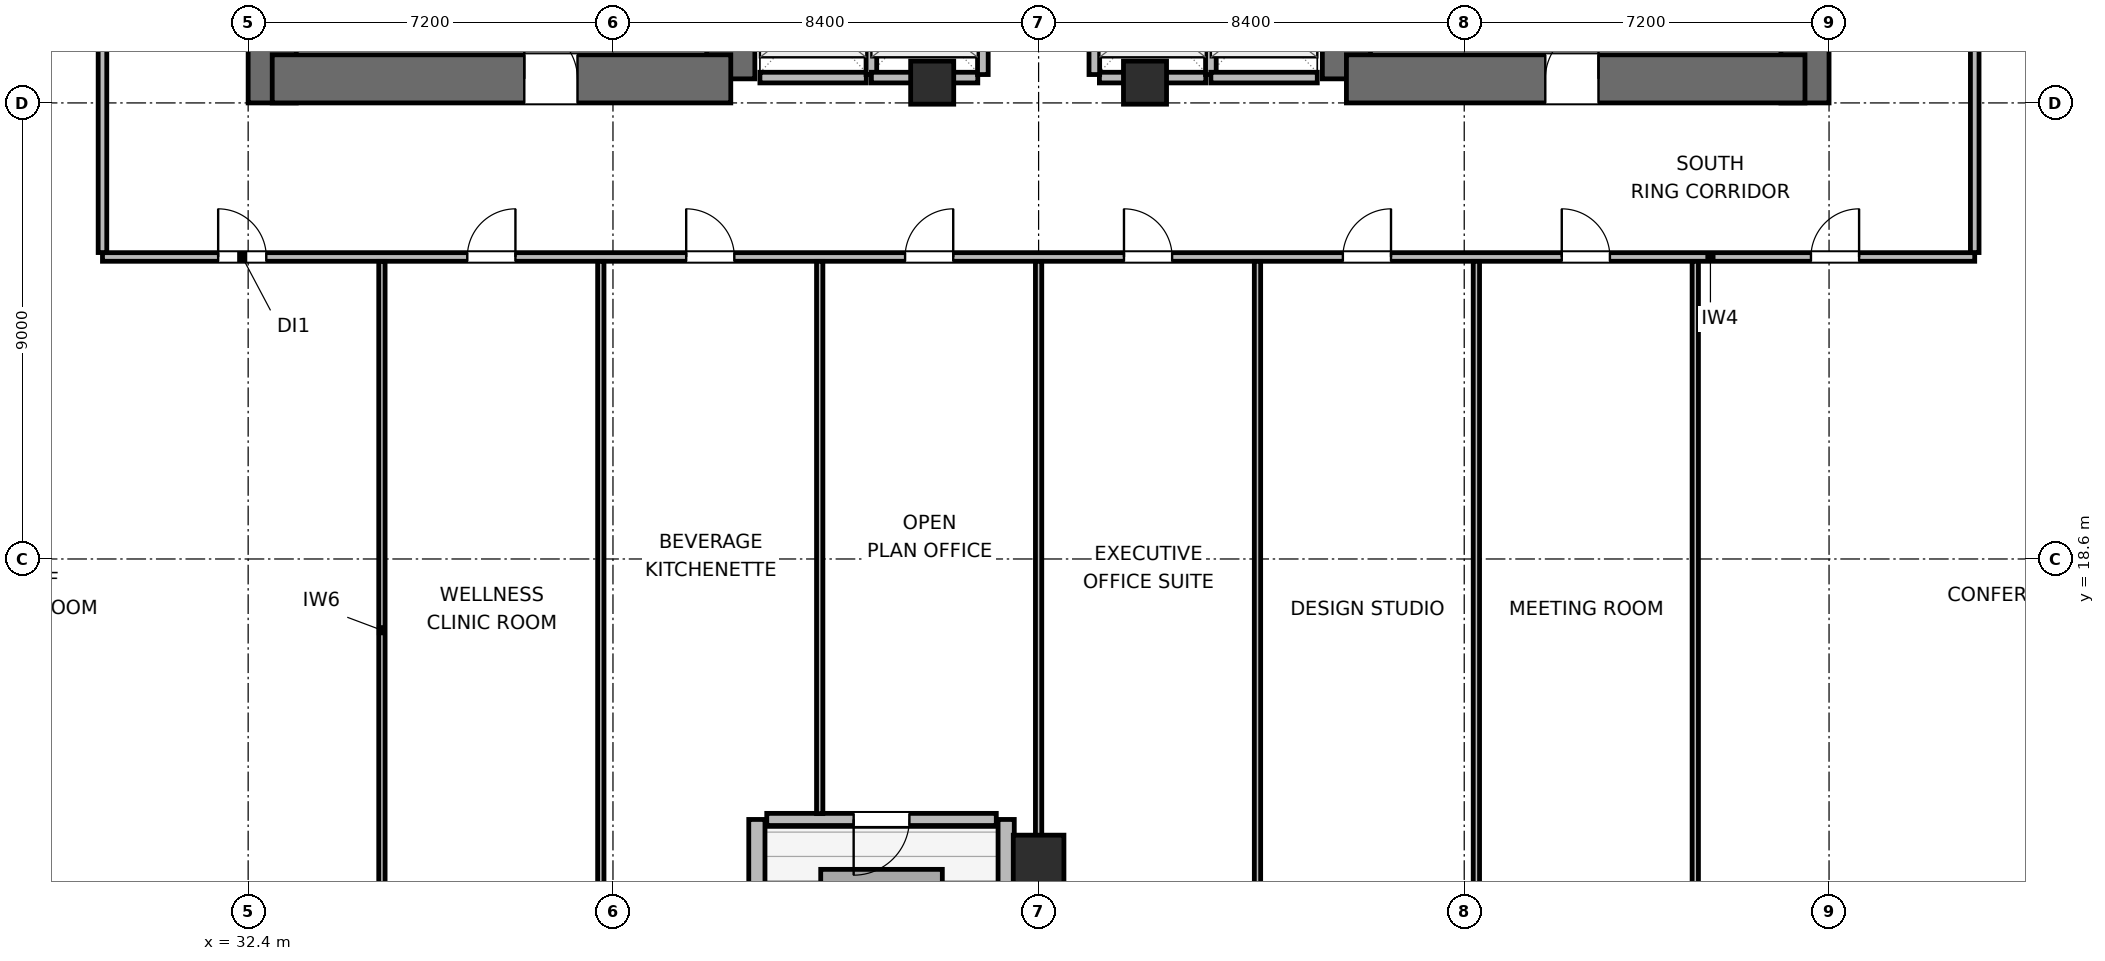
"""IFC4 building model, lengths in metres.
Left out: names, types, materials, properties, quantities, classifications, styles, units other than length and angle.
Written with IfcOpenShell. Run it as: python <this file> out.ifc"""

import sys

from ifc_helpers import new_model, si_unit, direction, frame, frame_2d, origin, origin_2d, place, context, subcontext, project, spatial, rectangle, extrude, element, fill, save


model = new_model("IFC4")
c1 = context("Model", 3, precision=1e-05, world=origin(), true_north=direction((0.0, 1.0)))
c2 = subcontext(c1, "Body", "Model", "MODEL_VIEW")
j1 = project(units=[si_unit("LENGTHUNIT", "METRE"), si_unit("PLANEANGLEUNIT", "RADIAN")], contexts=[c1])
p1 = place(None, origin())
s1 = spatial("IfcSite", under=j1, at=p1, CompositionType="ELEMENT")
p2 = place(p1, origin())
s2 = spatial("IfcBuilding", under=s1, at=p2, CompositionType="ELEMENT")
p3 = place(p2, frame((0.0, 0.0, 60.6)))
s3 = spatial("IfcBuildingStorey", under=s2, at=p3, CompositionType="ELEMENT", Elevation=60.6)
p4 = place(p3, frame((32.875, 27.6, 0.0), z_axis=(0.0, 0.0, 1.0), x_axis=(0.0, 1.0, 0.0)))
e1 = element("IfcWall", 1, at=p4, inside=s3, PredefinedType="SHEAR", context=c2, shape_type="SweptSolid", body=[
    extrude(rectangle(XDim=16.8, YDim=0.95, at=frame_2d((8.4, 0.0))), origin(), (0.0, 0.0, 1.0), 3.9),
])
p5 = place(p3, frame((41.925, 28.075, 0.0), z_axis=(0.0, 0.0, 1.0), x_axis=(0.0, 1.0, 0.0)))
e2 = element("IfcWall", 2, at=p5, inside=s3, PredefinedType="SHEAR", context=c2, shape_type="SweptSolid", body=[
    extrude(rectangle(XDim=6.325, YDim=0.95, at=frame_2d((3.163, 0.0))), origin(), (0.0, 0.0, 1.0), 3.9),
])
p6 = place(p3, frame((32.875, 28.075, 0.0), z_axis=(0.0, 0.0, 1.0), x_axis=(1.0, 0.0, 0.0)))
e3 = element("IfcWall", 3, at=p6, inside=s3, PredefinedType="SHEAR", context=c2, shape_type="SweptSolid", body=[
    extrude(rectangle(XDim=9.05, YDim=0.95, at=frame_2d((4.525, 0.0))), origin(), (0.0, 0.0, 1.0), 3.9),
])
p7 = place(p6, frame((4.975, 0.0, 0.0)))
e4 = element("IfcOpeningElement", 4, at=p7, cuts=e3, PredefinedType="OPENING", context=c2, shape_type="SweptSolid", body=[
    extrude(rectangle(XDim=1.05, YDim=2.04, at=frame_2d((0.525, 1.02))), frame((0.0, 0.485, 0.0), z_axis=(0.0, -1.0, 0.0), x_axis=(1.0, 0.0, 0.0)), (0.0, 0.0, 1.0), 0.97),
])
p8 = place(p3, frame((54.075, 28.075, 0.0), z_axis=(0.0, 0.0, 1.0), x_axis=(0.0, 1.0, 0.0)))
e5 = element("IfcWall", 5, at=p8, inside=s3, PredefinedType="SHEAR", context=c2, shape_type="SweptSolid", body=[
    extrude(rectangle(XDim=7.725, YDim=0.95, at=frame_2d((3.863, 0.0))), origin(), (0.0, 0.0, 1.0), 3.9),
])
p9 = place(p3, frame((63.125, 27.6, 0.0), z_axis=(0.0, 0.0, 1.0), x_axis=(0.0, 1.0, 0.0)))
e6 = element("IfcWall", 6, at=p9, inside=s3, PredefinedType="SHEAR", context=c2, shape_type="SweptSolid", body=[
    extrude(rectangle(XDim=16.8, YDim=0.95, at=frame_2d((8.4, 0.0))), origin(), (0.0, 0.0, 1.0), 3.9),
])
p10 = place(p3, frame((54.075, 28.075, 0.0), z_axis=(0.0, 0.0, 1.0), x_axis=(1.0, 0.0, 0.0)))
e7 = element("IfcWall", 7, at=p10, inside=s3, PredefinedType="SHEAR", context=c2, shape_type="SweptSolid", body=[
    extrude(rectangle(XDim=9.05, YDim=0.95, at=frame_2d((4.525, 0.0))), origin(), (0.0, 0.0, 1.0), 3.9),
])
p11 = place(p10, frame((3.925, 0.0, 0.0)))
e8 = element("IfcOpeningElement", 8, at=p11, cuts=e7, PredefinedType="OPENING", context=c2, shape_type="SweptSolid", body=[
    extrude(rectangle(XDim=1.05, YDim=2.04, at=frame_2d((0.525, 1.02))), frame((0.0, 0.485, 0.0), z_axis=(0.0, -1.0, 0.0), x_axis=(1.0, 0.0, 0.0)), (0.0, 0.0, 1.0), 0.97),
])
p12 = place(p3, frame((48.0, 12.4, 0.0), z_axis=(0.0, 0.0, 1.0), x_axis=(1.0, 0.0, 0.0)))
e9 = element("IfcColumn", 9, at=p12, inside=s3, PredefinedType="COLUMN", context=c2, shape_type="SweptSolid", body=[
    extrude(rectangle(XDim=1.0, YDim=1.5, at=origin_2d()), origin(), (0.0, 0.0, 1.0), 3.9),
])
for number, where, z_axis, x_axis in (
    (10, (45.9, 28.0, 0.0), (0.0, 0.0, 1.0), (1.0, 0.0, 0.0)),
    (11, (50.1, 28.0, 0.0), (0.0, 0.0, 1.0), (1.0, 0.0, 0.0)),
):
    element("IfcColumn", number, at=place(p3, frame(where, z_axis=z_axis, x_axis=x_axis)), inside=s3, PredefinedType="COLUMN", context=c2, shape_type="SweptSolid", body=[
        extrude(rectangle(XDim=0.85, YDim=0.85, at=origin_2d()), origin(), (0.0, 0.0, 1.0), 3.9),
    ])
p13 = place(p3, frame((47.36, 11.36, 0.0), z_axis=(0.0, 0.0, 1.0), x_axis=(0.0, 1.0, 0.0)))
e12 = element("IfcWall", 12, at=p13, inside=s3, PredefinedType="SOLIDWALL", context=c2, shape_type="SweptSolid", body=[
    extrude(rectangle(XDim=2.1, YDim=0.32, at=frame_2d((1.05, 0.0))), origin(), (0.0, 0.0, 1.0), 2.875),
])
p14 = place(p3, frame((47.165, 13.46, 0.0), z_axis=(0.0, 0.0, 1.0), x_axis=(-1.0, 0.0, 0.0)))
e13 = element("IfcWall", 13, at=p14, inside=s3, PredefinedType="SOLIDWALL", context=c2, shape_type="SweptSolid", body=[
    extrude(rectangle(XDim=4.53, YDim=0.24, at=frame_2d((2.265, 0.0))), origin(), (0.0, 0.0, 1.0), 3.64),
])
p15 = place(p14, frame((1.715, 0.0, 0.0)))
e14 = element("IfcOpeningElement", 14, at=p15, cuts=e13, PredefinedType="OPENING", context=c2, shape_type="SweptSolid", body=[
    extrude(rectangle(XDim=1.1, YDim=2.04, at=frame_2d((0.55, 1.02))), frame((0.0, 0.13, 0.0), z_axis=(0.0, -1.0, 0.0), x_axis=(1.0, 0.0, 0.0)), (0.0, 0.0, 1.0), 0.26),
])
p16 = place(p3, frame((42.44, 13.46, 0.0), z_axis=(0.0, 0.0, 1.0), x_axis=(0.0, -1.0, 0.0)))
e15 = element("IfcWall", 15, at=p16, inside=s3, PredefinedType="SOLIDWALL", context=c2, shape_type="SweptSolid", body=[
    extrude(rectangle(XDim=3.032, YDim=0.32, at=frame_2d((1.516, 0.0))), origin(), (0.0, 0.0, 1.0), 2.875),
])
p17 = place(p3, frame((42.5, 28.1, 0.0), z_axis=(0.0, 0.0, 1.0), x_axis=(1.0, 0.0, 0.0)))
e16 = element("IfcWall", 16, at=p17, inside=s3, PredefinedType="PARTITIONING", context=c2, shape_type="SweptSolid", body=[
    extrude(rectangle(XDim=2.1, YDim=0.21, at=frame_2d((1.05, 0.0))), origin(), (0.0, 0.0, 1.0), 2.525),
])
p18 = place(p3, frame((44.7, 28.16, 0.0), z_axis=(0.0, 0.0, 1.0), x_axis=(0.0, 1.0, 0.0)))
e17 = element("IfcWall", 17, at=p18, inside=s3, PredefinedType="PARTITIONING", context=c2, shape_type="SweptSolid", body=[
    extrude(rectangle(XDim=2.28, YDim=0.21, at=frame_2d((1.14, 0.0))), origin(), (0.0, 0.0, 1.0), 3.64),
])
p19 = place(p3, frame((44.7, 28.1, 0.0), z_axis=(0.0, 0.0, 1.0), x_axis=(1.0, 0.0, 0.0)))
e18 = element("IfcWall", 18, at=p19, inside=s3, PredefinedType="PARTITIONING", context=c2, shape_type="SweptSolid", body=[
    extrude(rectangle(XDim=2.1, YDim=0.21, at=frame_2d((1.05, 0.0))), origin(), (0.0, 0.0, 1.0), 2.525),
])
p20 = place(p3, frame((46.9, 28.16, 0.0), z_axis=(0.0, 0.0, 1.0), x_axis=(0.0, 1.0, 0.0)))
e19 = element("IfcWall", 19, at=p20, inside=s3, PredefinedType="PARTITIONING", context=c2, shape_type="SweptSolid", body=[
    extrude(rectangle(XDim=2.28, YDim=0.21, at=frame_2d((1.14, 0.0))), origin(), (0.0, 0.0, 1.0), 3.64),
])
p21 = place(p3, frame((49.2, 28.1, 0.0), z_axis=(0.0, 0.0, 1.0), x_axis=(1.0, 0.0, 0.0)))
e20 = element("IfcWall", 20, at=p21, inside=s3, PredefinedType="PARTITIONING", context=c2, shape_type="SweptSolid", body=[
    extrude(rectangle(XDim=2.1, YDim=0.21, at=frame_2d((1.05, 0.0))), origin(), (0.0, 0.0, 1.0), 2.525),
])
for number, where, z_axis, x_axis in (
    (21, (49.1, 28.16, 0.0), (0.0, 0.0, 1.0), (0.0, 1.0, 0.0)),
    (22, (51.4, 28.16, 0.0), (0.0, 0.0, 1.0), (0.0, 1.0, 0.0)),
):
    element("IfcWall", number, at=place(p3, frame(where, z_axis=z_axis, x_axis=x_axis)), inside=s3, PredefinedType="PARTITIONING", context=c2, shape_type="SweptSolid", body=[
        extrude(rectangle(XDim=2.28, YDim=0.21, at=frame_2d((1.14, 0.0))), origin(), (0.0, 0.0, 1.0), 3.64),
    ])
p22 = place(p3, frame((51.4, 28.1, 0.0), z_axis=(0.0, 0.0, 1.0), x_axis=(1.0, 0.0, 0.0)))
e23 = element("IfcWall", 23, at=p22, inside=s3, PredefinedType="PARTITIONING", context=c2, shape_type="SweptSolid", body=[
    extrude(rectangle(XDim=2.1, YDim=0.21, at=frame_2d((1.05, 0.0))), origin(), (0.0, 0.0, 1.0), 2.525),
])
p23 = place(p3, frame((29.525, 24.56, 0.0), z_axis=(0.0, 0.0, 1.0), x_axis=(1.0, 0.0, 0.0)))
e24 = element("IfcWall", 24, at=p23, inside=s3, PredefinedType="PARTITIONING", context=c2, shape_type="SweptSolid", body=[
    extrude(rectangle(XDim=36.95, YDim=0.17, at=frame_2d((18.475, 0.0))), origin(), (0.0, 0.0, 1.0), 3.64),
])
p24 = place(p23, frame((2.283, 0.0, 0.0)))
e25 = element("IfcOpeningElement", 25, at=p24, cuts=e24, PredefinedType="OPENING", context=c2, shape_type="SweptSolid", body=[
    extrude(rectangle(XDim=0.95, YDim=2.04, at=frame_2d((0.475, 1.02))), frame((0.0, 0.095, 0.0), z_axis=(0.0, -1.0, 0.0), x_axis=(1.0, 0.0, 0.0)), (0.0, 0.0, 1.0), 0.19),
])
p25 = place(p23, frame((7.2, 0.0, 0.0)))
e26 = element("IfcOpeningElement", 26, at=p25, cuts=e24, PredefinedType="OPENING", context=c2, shape_type="SweptSolid", body=[
    extrude(rectangle(XDim=0.95, YDim=2.04, at=frame_2d((0.475, 1.02))), frame((0.0, 0.095, 0.0), z_axis=(0.0, -1.0, 0.0), x_axis=(1.0, 0.0, 0.0)), (0.0, 0.0, 1.0), 0.19),
])
p26 = place(p23, frame((11.52, 0.0, 0.0)))
e27 = element("IfcOpeningElement", 27, at=p26, cuts=e24, PredefinedType="OPENING", context=c2, shape_type="SweptSolid", body=[
    extrude(rectangle(XDim=0.95, YDim=2.04, at=frame_2d((0.475, 1.02))), frame((0.0, 0.095, 0.0), z_axis=(0.0, -1.0, 0.0), x_axis=(1.0, 0.0, 0.0)), (0.0, 0.0, 1.0), 0.19),
])
p27 = place(p23, frame((15.84, 0.0, 0.0)))
e28 = element("IfcOpeningElement", 28, at=p27, cuts=e24, PredefinedType="OPENING", context=c2, shape_type="SweptSolid", body=[
    extrude(rectangle(XDim=0.95, YDim=2.04, at=frame_2d((0.475, 1.02))), frame((0.0, 0.095, 0.0), z_axis=(0.0, -1.0, 0.0), x_axis=(1.0, 0.0, 0.0)), (0.0, 0.0, 1.0), 0.19),
])
p28 = place(p23, frame((20.16, 0.0, 0.0)))
e29 = element("IfcOpeningElement", 29, at=p28, cuts=e24, PredefinedType="OPENING", context=c2, shape_type="SweptSolid", body=[
    extrude(rectangle(XDim=0.95, YDim=2.04, at=frame_2d((0.475, 1.02))), frame((0.0, 0.095, 0.0), z_axis=(0.0, -1.0, 0.0), x_axis=(1.0, 0.0, 0.0)), (0.0, 0.0, 1.0), 0.19),
])
p29 = place(p23, frame((24.48, 0.0, 0.0)))
e30 = element("IfcOpeningElement", 30, at=p29, cuts=e24, PredefinedType="OPENING", context=c2, shape_type="SweptSolid", body=[
    extrude(rectangle(XDim=0.95, YDim=2.04, at=frame_2d((0.475, 1.02))), frame((0.0, 0.095, 0.0), z_axis=(0.0, -1.0, 0.0), x_axis=(1.0, 0.0, 0.0)), (0.0, 0.0, 1.0), 0.19),
])
p30 = place(p23, frame((28.8, 0.0, 0.0)))
e31 = element("IfcOpeningElement", 31, at=p30, cuts=e24, PredefinedType="OPENING", context=c2, shape_type="SweptSolid", body=[
    extrude(rectangle(XDim=0.95, YDim=2.04, at=frame_2d((0.475, 1.02))), frame((0.0, 0.095, 0.0), z_axis=(0.0, -1.0, 0.0), x_axis=(1.0, 0.0, 0.0)), (0.0, 0.0, 1.0), 0.19),
])
p31 = place(p23, frame((33.718, 0.0, 0.0)))
e32 = element("IfcOpeningElement", 32, at=p31, cuts=e24, PredefinedType="OPENING", context=c2, shape_type="SweptSolid", body=[
    extrude(rectangle(XDim=0.95, YDim=2.04, at=frame_2d((0.475, 1.02))), frame((0.0, 0.095, 0.0), z_axis=(0.0, -1.0, 0.0), x_axis=(1.0, 0.0, 0.0)), (0.0, 0.0, 1.0), 0.19),
])
p32 = place(p3, frame((29.525, 24.647, 0.0), z_axis=(0.0, 0.0, 1.0), x_axis=(0.0, 1.0, 0.0)))
e33 = element("IfcWall", 33, at=p32, inside=s3, PredefinedType="PARTITIONING", context=c2, shape_type="SweptSolid", body=[
    extrude(rectangle(XDim=22.706, YDim=0.17, at=frame_2d((11.353, 0.0))), origin(), (0.0, 0.0, 1.0), 3.64),
])
p33 = place(p32, frame((4.758, 0.0, 0.0)))
e34 = element("IfcOpeningElement", 34, at=p33, cuts=e33, PredefinedType="OPENING", context=c2, shape_type="SweptSolid", body=[
    extrude(rectangle(XDim=0.95, YDim=2.04, at=frame_2d((0.475, 1.02))), frame((0.0, 0.095, 0.0), z_axis=(0.0, -1.0, 0.0), x_axis=(1.0, 0.0, 0.0)), (0.0, 0.0, 1.0), 0.19),
])
p34 = place(p32, frame((16.198, 0.0, 0.0)))
e35 = element("IfcOpeningElement", 35, at=p34, cuts=e33, PredefinedType="OPENING", context=c2, shape_type="SweptSolid", body=[
    extrude(rectangle(XDim=0.95, YDim=2.04, at=frame_2d((0.475, 1.02))), frame((0.0, 0.095, 0.0), z_axis=(0.0, -1.0, 0.0), x_axis=(1.0, 0.0, 0.0)), (0.0, 0.0, 1.0), 0.19),
])
p35 = place(p3, frame((66.475, 24.647, 0.0), z_axis=(0.0, 0.0, 1.0), x_axis=(0.0, 1.0, 0.0)))
e36 = element("IfcWall", 36, at=p35, inside=s3, PredefinedType="PARTITIONING", context=c2, shape_type="SweptSolid", body=[
    extrude(rectangle(XDim=22.706, YDim=0.17, at=frame_2d((11.353, 0.0))), origin(), (0.0, 0.0, 1.0), 3.64),
])
p36 = place(p35, frame((5.758, 0.0, 0.0)))
e37 = element("IfcOpeningElement", 37, at=p36, cuts=e36, PredefinedType="OPENING", context=c2, shape_type="SweptSolid", body=[
    extrude(rectangle(XDim=0.95, YDim=2.04, at=frame_2d((0.475, 1.02))), frame((0.0, 0.095, 0.0), z_axis=(0.0, -1.0, 0.0), x_axis=(1.0, 0.0, 0.0)), (0.0, 0.0, 1.0), 0.19),
])
p37 = place(p35, frame((17.198, 0.0, 0.0)))
e38 = element("IfcOpeningElement", 38, at=p37, cuts=e36, PredefinedType="OPENING", context=c2, shape_type="SweptSolid", body=[
    extrude(rectangle(XDim=0.95, YDim=2.04, at=frame_2d((0.475, 1.02))), frame((0.0, 0.095, 0.0), z_axis=(0.0, -1.0, 0.0), x_axis=(1.0, 0.0, 0.0)), (0.0, 0.0, 1.0), 0.19),
])
p38 = place(p3, frame((35.04, 9.915, 0.0), z_axis=(0.0, 0.0, 1.0), x_axis=(0.0, 1.0, 0.0)))
e39 = element("IfcWall", 39, at=p38, inside=s3, PredefinedType="PARTITIONING", context=c2, shape_type="SweptSolid", body=[
    extrude(rectangle(XDim=14.558, YDim=0.125, at=frame_2d((7.279, 0.0))), origin(), (0.0, 0.0, 1.0), 3.64),
])
p39 = place(p3, frame((39.36, 9.915, 0.0), z_axis=(0.0, 0.0, 1.0), x_axis=(0.0, 1.0, 0.0)))
e40 = element("IfcWall", 40, at=p39, inside=s3, PredefinedType="PARTITIONING", context=c2, shape_type="SweptSolid", body=[
    extrude(rectangle(XDim=14.558, YDim=0.125, at=frame_2d((7.279, 0.0))), origin(), (0.0, 0.0, 1.0), 2.93),
])
p40 = place(p3, frame((43.68, 13.575, 0.0), z_axis=(0.0, 0.0, 1.0), x_axis=(0.0, 1.0, 0.0)))
e41 = element("IfcWall", 41, at=p40, inside=s3, PredefinedType="PARTITIONING", context=c2, shape_type="SweptSolid", body=[
    extrude(rectangle(XDim=10.898, YDim=0.125, at=frame_2d((5.449, 0.0))), origin(), (0.0, 0.0, 1.0), 3.003),
])
p41 = place(p3, frame((48.0, 11.515, 0.0), z_axis=(0.0, 0.0, 1.0), x_axis=(0.0, 1.0, 0.0)))
e42 = element("IfcWall", 42, at=p41, inside=s3, PredefinedType="PARTITIONING", context=c2, shape_type="SweptSolid", body=[
    extrude(rectangle(XDim=12.958, YDim=0.125, at=frame_2d((6.479, 0.0))), origin(), (0.0, 0.0, 1.0), 2.93),
])
p42 = place(p3, frame((52.32, 11.346, 0.0), z_axis=(0.0, 0.0, 1.0), x_axis=(0.0, 1.0, 0.0)))
e43 = element("IfcWall", 43, at=p42, inside=s3, PredefinedType="PARTITIONING", context=c2, shape_type="SweptSolid", body=[
    extrude(rectangle(XDim=13.127, YDim=0.125, at=frame_2d((6.563, 0.0))), origin(), (0.0, 0.0, 1.0), 3.003),
])
p43 = place(p3, frame((56.64, 9.915, 0.0), z_axis=(0.0, 0.0, 1.0), x_axis=(0.0, 1.0, 0.0)))
e44 = element("IfcWall", 44, at=p43, inside=s3, PredefinedType="PARTITIONING", context=c2, shape_type="SweptSolid", body=[
    extrude(rectangle(XDim=14.558, YDim=0.125, at=frame_2d((7.279, 0.0))), origin(), (0.0, 0.0, 1.0), 2.93),
])
p44 = place(p3, frame((60.96, 9.915, 0.0), z_axis=(0.0, 0.0, 1.0), x_axis=(0.0, 1.0, 0.0)))
e45 = element("IfcWall", 45, at=p44, inside=s3, PredefinedType="PARTITIONING", context=c2, shape_type="SweptSolid", body=[
    extrude(rectangle(XDim=14.558, YDim=0.125, at=frame_2d((7.279, 0.0))), origin(), (0.0, 0.0, 1.0), 3.64),
])
p45 = place(p15, origin())
e46 = element("IfcDoor", 46, at=p45, inside=s3, OperationType="SINGLE_SWING_RIGHT", PredefinedType="DOOR", context=c2, shape_type="SweptSolid", body=[
    extrude(rectangle(XDim=1.1, YDim=2.04, at=frame_2d((0.55, 1.02))), frame((0.0, 0.025, 0.0), z_axis=(0.0, -1.0, 0.0), x_axis=(1.0, 0.0, 0.0)), (0.0, 0.0, 1.0), 0.05),
])
fill(e14, e46)
p46 = place(p7, origin())
e47 = element("IfcDoor", 47, at=p46, inside=s3, OperationType="SINGLE_SWING_LEFT", PredefinedType="DOOR", context=c2, shape_type="SweptSolid", body=[
    extrude(rectangle(XDim=1.05, YDim=2.04, at=frame_2d((0.525, 1.02))), frame((0.0, 0.025, 0.0), z_axis=(0.0, -1.0, 0.0), x_axis=(1.0, 0.0, 0.0)), (0.0, 0.0, 1.0), 0.05),
])
fill(e4, e47)
p47 = place(p11, origin())
e48 = element("IfcDoor", 48, at=p47, inside=s3, OperationType="SINGLE_SWING_RIGHT", PredefinedType="DOOR", context=c2, shape_type="SweptSolid", body=[
    extrude(rectangle(XDim=1.05, YDim=2.04, at=frame_2d((0.525, 1.02))), frame((0.0, 0.025, 0.0), z_axis=(0.0, -1.0, 0.0), x_axis=(1.0, 0.0, 0.0)), (0.0, 0.0, 1.0), 0.05),
])
fill(e8, e48)
p48 = place(p24, origin())
e49 = element("IfcDoor", 49, at=p48, inside=s3, OperationType="SINGLE_SWING_LEFT", PredefinedType="DOOR", context=c2, shape_type="SweptSolid", body=[
    extrude(rectangle(XDim=0.95, YDim=2.04, at=frame_2d((0.475, 1.02))), frame((0.0, 0.025, 0.0), z_axis=(0.0, -1.0, 0.0), x_axis=(1.0, 0.0, 0.0)), (0.0, 0.0, 1.0), 0.05),
])
fill(e25, e49)
p49 = place(p25, origin())
e50 = element("IfcDoor", 50, at=p49, inside=s3, OperationType="SINGLE_SWING_RIGHT", PredefinedType="DOOR", context=c2, shape_type="SweptSolid", body=[
    extrude(rectangle(XDim=0.95, YDim=2.04, at=frame_2d((0.475, 1.02))), frame((0.0, 0.025, 0.0), z_axis=(0.0, -1.0, 0.0), x_axis=(1.0, 0.0, 0.0)), (0.0, 0.0, 1.0), 0.05),
])
fill(e26, e50)
p50 = place(p26, origin())
e51 = element("IfcDoor", 51, at=p50, inside=s3, OperationType="SINGLE_SWING_LEFT", PredefinedType="DOOR", context=c2, shape_type="SweptSolid", body=[
    extrude(rectangle(XDim=0.95, YDim=2.04, at=frame_2d((0.475, 1.02))), frame((0.0, 0.025, 0.0), z_axis=(0.0, -1.0, 0.0), x_axis=(1.0, 0.0, 0.0)), (0.0, 0.0, 1.0), 0.05),
])
fill(e27, e51)
p51 = place(p27, origin())
e52 = element("IfcDoor", 52, at=p51, inside=s3, OperationType="SINGLE_SWING_RIGHT", PredefinedType="DOOR", context=c2, shape_type="SweptSolid", body=[
    extrude(rectangle(XDim=0.95, YDim=2.04, at=frame_2d((0.475, 1.02))), frame((0.0, 0.025, 0.0), z_axis=(0.0, -1.0, 0.0), x_axis=(1.0, 0.0, 0.0)), (0.0, 0.0, 1.0), 0.05),
])
fill(e28, e52)
p52 = place(p28, origin())
e53 = element("IfcDoor", 53, at=p52, inside=s3, OperationType="SINGLE_SWING_LEFT", PredefinedType="DOOR", context=c2, shape_type="SweptSolid", body=[
    extrude(rectangle(XDim=0.95, YDim=2.04, at=frame_2d((0.475, 1.02))), frame((0.0, 0.025, 0.0), z_axis=(0.0, -1.0, 0.0), x_axis=(1.0, 0.0, 0.0)), (0.0, 0.0, 1.0), 0.05),
])
fill(e29, e53)
p53 = place(p29, origin())
e54 = element("IfcDoor", 54, at=p53, inside=s3, OperationType="SINGLE_SWING_RIGHT", PredefinedType="DOOR", context=c2, shape_type="SweptSolid", body=[
    extrude(rectangle(XDim=0.95, YDim=2.04, at=frame_2d((0.475, 1.02))), frame((0.0, 0.025, 0.0), z_axis=(0.0, -1.0, 0.0), x_axis=(1.0, 0.0, 0.0)), (0.0, 0.0, 1.0), 0.05),
])
fill(e30, e54)
p54 = place(p30, origin())
e55 = element("IfcDoor", 55, at=p54, inside=s3, OperationType="SINGLE_SWING_LEFT", PredefinedType="DOOR", context=c2, shape_type="SweptSolid", body=[
    extrude(rectangle(XDim=0.95, YDim=2.04, at=frame_2d((0.475, 1.02))), frame((0.0, 0.025, 0.0), z_axis=(0.0, -1.0, 0.0), x_axis=(1.0, 0.0, 0.0)), (0.0, 0.0, 1.0), 0.05),
])
fill(e31, e55)
p55 = place(p31, origin())
e56 = element("IfcDoor", 56, at=p55, inside=s3, OperationType="SINGLE_SWING_RIGHT", PredefinedType="DOOR", context=c2, shape_type="SweptSolid", body=[
    extrude(rectangle(XDim=0.95, YDim=2.04, at=frame_2d((0.475, 1.02))), frame((0.0, 0.025, 0.0), z_axis=(0.0, -1.0, 0.0), x_axis=(1.0, 0.0, 0.0)), (0.0, 0.0, 1.0), 0.05),
])
fill(e32, e56)
save(model, sys.argv[1])
